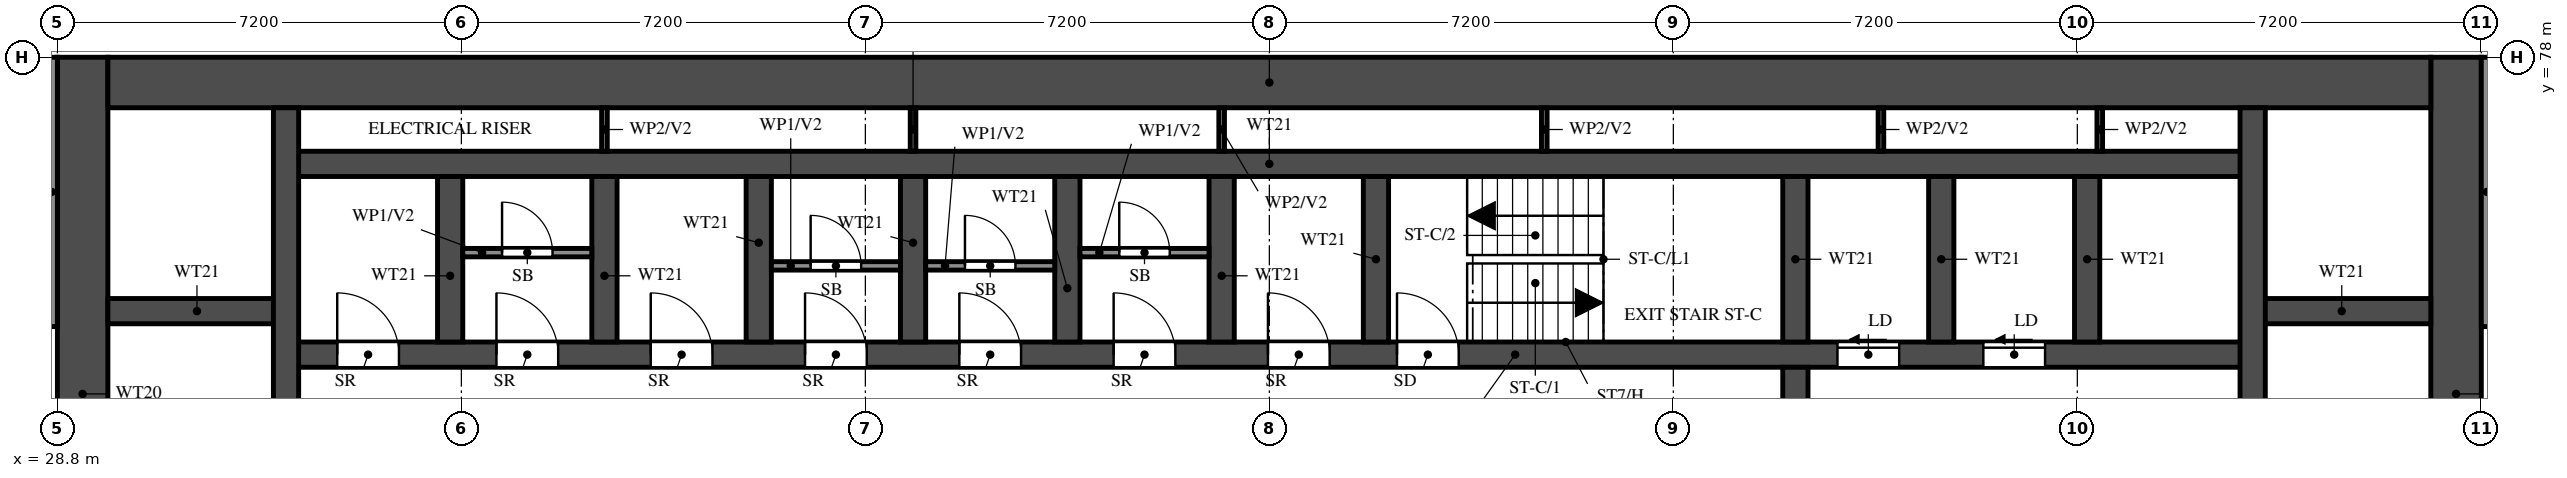
"""IFC4 building model, lengths in metres.
Left out: names, types, materials, properties, quantities, classifications, styles, units other than length and angle.
Written with IfcOpenShell. Run it as: python <this file> out.ifc"""

import sys

from ifc_helpers import new_model, si_unit, direction, frame, frame_2d, origin, place, context, subcontext, project, spatial, rectangle, extrude, element, fill, save


model = new_model("IFC4")
c1 = context("Model", 3, precision=1e-05, world=origin(), true_north=direction((0.0, 1.0)))
c2 = subcontext(c1, "Body", "Model", "MODEL_VIEW")
j1 = project(units=[si_unit("LENGTHUNIT", "METRE"), si_unit("PLANEANGLEUNIT", "RADIAN")], contexts=[c1])
p1 = place(None, origin())
s1 = spatial("IfcSite", under=j1, at=p1, CompositionType="ELEMENT")
p2 = place(p1, origin())
s2 = spatial("IfcBuilding", under=s1, at=p2, CompositionType="ELEMENT")
p3 = place(p2, frame((0.0, 0.0, 76.0)))
s3 = spatial("IfcBuildingStorey", under=s2, at=p3, CompositionType="ELEMENT", Elevation=76.0)
for number, where, z_axis, x_axis in (
    (1, (29.25, 66.0, 0.0), (0.0, 0.0, 1.0), (0.0, 1.0, 0.0)),
    (2, (71.55, 66.0, 0.0), (0.0, 0.0, 1.0), (0.0, 1.0, 0.0)),
):
    element("IfcWall", number, at=place(p3, frame(where, z_axis=z_axis, x_axis=x_axis)), inside=s3, PredefinedType="SHEAR", context=c2, shape_type="SweptSolid", body=[
        extrude(rectangle(XDim=12.0, YDim=0.9, at=frame_2d((6.0, 0.0))), origin(), (0.0, 0.0, 1.0), 3.18),
    ])
p4 = place(p3, frame((29.7, 77.55, 0.0), z_axis=(0.0, 0.0, 1.0), x_axis=(1.0, 0.0, 0.0)))
e3 = element("IfcWall", 3, at=p4, inside=s3, PredefinedType="SHEAR", context=c2, shape_type="SweptSolid", body=[
    extrude(rectangle(XDim=41.4, YDim=0.9, at=frame_2d((20.7, 0.0))), origin(), (0.0, 0.0, 1.0), 3.18),
])
p5 = place(p3, frame((32.875, 72.7, 0.0), z_axis=(0.0, 0.0, 1.0), x_axis=(1.0, 0.0, 0.0)))
e4 = element("IfcWall", 4, at=p5, inside=s3, PredefinedType="SHEAR", context=c2, shape_type="SweptSolid", body=[
    extrude(rectangle(XDim=35.05, YDim=0.45, at=frame_2d((17.525, 0.0))), origin(), (0.0, 0.0, 1.0), 3.18),
])
p6 = place(p5, frame((19.8, 0.0, 0.0)))
e5 = element("IfcOpeningElement", 5, at=p6, cuts=e4, PredefinedType="OPENING", context=c2, shape_type="SweptSolid", body=[
    extrude(rectangle(XDim=1.1, YDim=2.1, at=frame_2d((0.55, 1.05))), frame((0.0, 0.235, 0.0), z_axis=(0.0, -1.0, 0.0), x_axis=(1.0, 0.0, 0.0)), (0.0, 0.0, 1.0), 0.47),
])
p7 = place(p5, frame((27.65, 0.0, 0.0)))
e6 = element("IfcOpeningElement", 6, at=p7, cuts=e4, PredefinedType="OPENING", context=c2, shape_type="SweptSolid", body=[
    extrude(rectangle(XDim=1.1, YDim=2.1, at=frame_2d((0.55, 1.05))), frame((0.0, 0.235, 0.0), z_axis=(0.0, -1.0, 0.0), x_axis=(1.0, 0.0, 0.0)), (0.0, 0.0, 1.0), 0.47),
])
p8 = place(p5, frame((30.25, 0.0, 0.0)))
e7 = element("IfcOpeningElement", 7, at=p8, cuts=e4, PredefinedType="OPENING", context=c2, shape_type="SweptSolid", body=[
    extrude(rectangle(XDim=1.1, YDim=2.1, at=frame_2d((0.55, 1.05))), frame((0.0, 0.235, 0.0), z_axis=(0.0, -1.0, 0.0), x_axis=(1.0, 0.0, 0.0)), (0.0, 0.0, 1.0), 0.47),
])
p9 = place(p5, frame((3.75, 0.0, 0.0)))
e8 = element("IfcOpeningElement", 8, at=p9, cuts=e4, PredefinedType="OPENING", context=c2, shape_type="SweptSolid", body=[
    extrude(rectangle(XDim=1.1, YDim=2.1, at=frame_2d((0.55, 1.05))), frame((0.0, 0.235, 0.0), z_axis=(0.0, -1.0, 0.0), x_axis=(1.0, 0.0, 0.0)), (0.0, 0.0, 1.0), 0.47),
])
p10 = place(p5, frame((6.5, 0.0, 0.0)))
e9 = element("IfcOpeningElement", 9, at=p10, cuts=e4, PredefinedType="OPENING", context=c2, shape_type="SweptSolid", body=[
    extrude(rectangle(XDim=1.1, YDim=2.1, at=frame_2d((0.55, 1.05))), frame((0.0, 0.235, 0.0), z_axis=(0.0, -1.0, 0.0), x_axis=(1.0, 0.0, 0.0)), (0.0, 0.0, 1.0), 0.47),
])
p11 = place(p5, frame((9.25, 0.0, 0.0)))
e10 = element("IfcOpeningElement", 10, at=p11, cuts=e4, PredefinedType="OPENING", context=c2, shape_type="SweptSolid", body=[
    extrude(rectangle(XDim=1.1, YDim=2.1, at=frame_2d((0.55, 1.05))), frame((0.0, 0.235, 0.0), z_axis=(0.0, -1.0, 0.0), x_axis=(1.0, 0.0, 0.0)), (0.0, 0.0, 1.0), 0.47),
])
p12 = place(p5, frame((12.0, 0.0, 0.0)))
e11 = element("IfcOpeningElement", 11, at=p12, cuts=e4, PredefinedType="OPENING", context=c2, shape_type="SweptSolid", body=[
    extrude(rectangle(XDim=1.1, YDim=2.1, at=frame_2d((0.55, 1.05))), frame((0.0, 0.235, 0.0), z_axis=(0.0, -1.0, 0.0), x_axis=(1.0, 0.0, 0.0)), (0.0, 0.0, 1.0), 0.47),
])
p13 = place(p5, frame((14.75, 0.0, 0.0)))
e12 = element("IfcOpeningElement", 12, at=p13, cuts=e4, PredefinedType="OPENING", context=c2, shape_type="SweptSolid", body=[
    extrude(rectangle(XDim=1.1, YDim=2.1, at=frame_2d((0.55, 1.05))), frame((0.0, 0.235, 0.0), z_axis=(0.0, -1.0, 0.0), x_axis=(1.0, 0.0, 0.0)), (0.0, 0.0, 1.0), 0.47),
])
p14 = place(p5, frame((17.5, 0.0, 0.0)))
e13 = element("IfcOpeningElement", 13, at=p14, cuts=e4, PredefinedType="OPENING", context=c2, shape_type="SweptSolid", body=[
    extrude(rectangle(XDim=1.1, YDim=2.1, at=frame_2d((0.55, 1.05))), frame((0.0, 0.235, 0.0), z_axis=(0.0, -1.0, 0.0), x_axis=(1.0, 0.0, 0.0)), (0.0, 0.0, 1.0), 0.47),
])
p15 = place(p5, frame((0.913, 0.0, 0.0)))
e14 = element("IfcOpeningElement", 14, at=p15, cuts=e4, PredefinedType="OPENING", context=c2, shape_type="SweptSolid", body=[
    extrude(rectangle(XDim=1.1, YDim=2.1, at=frame_2d((0.55, 1.05))), frame((0.0, 0.235, 0.0), z_axis=(0.0, -1.0, 0.0), x_axis=(1.0, 0.0, 0.0)), (0.0, 0.0, 1.0), 0.47),
])
p16 = place(p3, frame((32.875, 76.1, 0.0), z_axis=(0.0, 0.0, 1.0), x_axis=(1.0, 0.0, 0.0)))
e15 = element("IfcWall", 15, at=p16, inside=s3, PredefinedType="SHEAR", context=c2, shape_type="SweptSolid", body=[
    extrude(rectangle(XDim=35.05, YDim=0.45, at=frame_2d((17.525, 0.0))), origin(), (0.0, 0.0, 1.0), 3.18),
])
for number, where, z_axis, x_axis in (
    (16, (29.7, 73.475, 0.0), (0.0, 0.0, 1.0), (1.0, 0.0, 0.0)),
    (17, (67.925, 73.475, 0.0), (0.0, 0.0, 1.0), (1.0, 0.0, 0.0)),
):
    element("IfcWall", number, at=place(p3, frame(where, z_axis=z_axis, x_axis=x_axis)), inside=s3, PredefinedType="SHEAR", context=c2, shape_type="SweptSolid", body=[
        extrude(rectangle(XDim=3.175, YDim=0.45, at=frame_2d((1.587, 0.0))), origin(), (0.0, 0.0, 1.0), 3.18),
    ])
p17 = place(p3, frame((32.875, 66.45, 0.0), z_axis=(0.0, 0.0, 1.0), x_axis=(0.0, 1.0, 0.0)))
e18 = element("IfcWall", 18, at=p17, inside=s3, PredefinedType="SHEAR", context=c2, shape_type="SweptSolid", body=[
    extrude(rectangle(XDim=10.65, YDim=0.45, at=frame_2d((5.325, 0.0))), origin(), (0.0, 0.0, 1.0), 3.18),
])
p18 = place(p3, frame((67.925, 66.45, 0.0), z_axis=(0.0, 0.0, 1.0), x_axis=(0.0, 1.0, 0.0)))
e19 = element("IfcWall", 19, at=p18, inside=s3, PredefinedType="SHEAR", context=c2, shape_type="SweptSolid", body=[
    extrude(rectangle(XDim=10.65, YDim=0.45, at=frame_2d((5.325, 0.0))), origin(), (0.0, 0.0, 1.0), 3.18),
])
p19 = place(p18, frame((0.15, 0.0, 0.0)))
e20 = element("IfcOpeningElement", 20, at=p19, cuts=e19, PredefinedType="OPENING", context=c2, shape_type="SweptSolid", body=[
    extrude(rectangle(XDim=1.1, YDim=2.1, at=frame_2d((0.55, 1.05))), frame((0.0, 0.235, 0.0), z_axis=(0.0, -1.0, 0.0), x_axis=(1.0, 0.0, 0.0)), (0.0, 0.0, 1.0), 0.47),
])
p20 = place(p3, frame((59.775, 66.45, 0.0), z_axis=(0.0, 0.0, 1.0), x_axis=(0.0, 1.0, 0.0)))
e21 = element("IfcWall", 21, at=p20, inside=s3, PredefinedType="SHEAR", context=c2, shape_type="SweptSolid", body=[
    extrude(rectangle(XDim=6.025, YDim=0.45, at=frame_2d((3.013, 0.0))), origin(), (0.0, 0.0, 1.0), 3.18),
])
p21 = place(p20, frame((3.85, 0.0, 0.0)))
e22 = element("IfcOpeningElement", 22, at=p21, cuts=e21, PredefinedType="OPENING", context=c2, shape_type="SweptSolid", body=[
    extrude(rectangle(XDim=1.2, YDim=2.1, at=frame_2d((0.6, 1.05))), frame((0.0, 0.235, 0.0), z_axis=(0.0, -1.0, 0.0), x_axis=(1.0, 0.0, 0.0)), (0.0, 0.0, 1.0), 0.47),
])
for number, where, z_axis, x_axis in (
    (23, (59.775, 72.925, 0.0), (0.0, 0.0, 1.0), (0.0, 1.0, 0.0)),
    (24, (35.8, 72.925, 0.0), (0.0, 0.0, 1.0), (0.0, 1.0, 0.0)),
    (25, (38.55, 72.925, 0.0), (0.0, 0.0, 1.0), (0.0, 1.0, 0.0)),
    (26, (41.3, 72.925, 0.0), (0.0, 0.0, 1.0), (0.0, 1.0, 0.0)),
    (27, (44.05, 72.925, 0.0), (0.0, 0.0, 1.0), (0.0, 1.0, 0.0)),
    (28, (46.8, 72.925, 0.0), (0.0, 0.0, 1.0), (0.0, 1.0, 0.0)),
    (29, (49.55, 72.925, 0.0), (0.0, 0.0, 1.0), (0.0, 1.0, 0.0)),
    (30, (52.3, 72.925, 0.0), (0.0, 0.0, 1.0), (0.0, 1.0, 0.0)),
    (31, (62.375, 72.925, 0.0), (0.0, 0.0, 1.0), (0.0, 1.0, 0.0)),
    (32, (64.975, 72.925, 0.0), (0.0, 0.0, 1.0), (0.0, 1.0, 0.0)),
):
    element("IfcWall", number, at=place(p3, frame(where, z_axis=z_axis, x_axis=x_axis)), inside=s3, PredefinedType="SHEAR", context=c2, shape_type="SweptSolid", body=[
        extrude(rectangle(XDim=2.95, YDim=0.45, at=frame_2d((1.475, 0.0))), origin(), (0.0, 0.0, 1.0), 3.18),
    ])
p22 = place(p3, frame((36.025, 74.518, 0.0), z_axis=(0.0, 0.0, 1.0), x_axis=(1.0, 0.0, 0.0)))
e33 = element("IfcWall", 33, at=p22, inside=s3, PredefinedType="PARTITIONING", context=c2, shape_type="SweptSolid", body=[
    extrude(rectangle(XDim=2.3, YDim=0.15, at=frame_2d((1.15, 0.0))), origin(), (0.0, 0.0, 1.0), 3.18),
])
p23 = place(p22, frame((0.7, 0.0, 0.0)))
e34 = element("IfcOpeningElement", 34, at=p23, cuts=e33, PredefinedType="OPENING", context=c2, shape_type="SweptSolid", body=[
    extrude(rectangle(XDim=0.9, YDim=2.1, at=frame_2d((0.45, 1.05))), frame((0.0, 0.085, 0.0), z_axis=(0.0, -1.0, 0.0), x_axis=(1.0, 0.0, 0.0)), (0.0, 0.0, 1.0), 0.17),
])
p24 = place(p3, frame((41.525, 74.282, 0.0), z_axis=(0.0, 0.0, 1.0), x_axis=(1.0, 0.0, 0.0)))
e35 = element("IfcWall", 35, at=p24, inside=s3, PredefinedType="PARTITIONING", context=c2, shape_type="SweptSolid", body=[
    extrude(rectangle(XDim=2.3, YDim=0.15, at=frame_2d((1.15, 0.0))), origin(), (0.0, 0.0, 1.0), 3.18),
])
p25 = place(p24, frame((0.7, 0.0, 0.0)))
e36 = element("IfcOpeningElement", 36, at=p25, cuts=e35, PredefinedType="OPENING", context=c2, shape_type="SweptSolid", body=[
    extrude(rectangle(XDim=0.9, YDim=2.1, at=frame_2d((0.45, 1.05))), frame((0.0, 0.085, 0.0), z_axis=(0.0, -1.0, 0.0), x_axis=(1.0, 0.0, 0.0)), (0.0, 0.0, 1.0), 0.17),
])
p26 = place(p3, frame((44.275, 74.282, 0.0), z_axis=(0.0, 0.0, 1.0), x_axis=(1.0, 0.0, 0.0)))
e37 = element("IfcWall", 37, at=p26, inside=s3, PredefinedType="PARTITIONING", context=c2, shape_type="SweptSolid", body=[
    extrude(rectangle(XDim=2.3, YDim=0.15, at=frame_2d((1.15, 0.0))), origin(), (0.0, 0.0, 1.0), 3.18),
])
p27 = place(p26, frame((0.7, 0.0, 0.0)))
e38 = element("IfcOpeningElement", 38, at=p27, cuts=e37, PredefinedType="OPENING", context=c2, shape_type="SweptSolid", body=[
    extrude(rectangle(XDim=0.9, YDim=2.1, at=frame_2d((0.45, 1.05))), frame((0.0, 0.085, 0.0), z_axis=(0.0, -1.0, 0.0), x_axis=(1.0, 0.0, 0.0)), (0.0, 0.0, 1.0), 0.17),
])
p28 = place(p3, frame((47.025, 74.518, 0.0), z_axis=(0.0, 0.0, 1.0), x_axis=(1.0, 0.0, 0.0)))
e39 = element("IfcWall", 39, at=p28, inside=s3, PredefinedType="PARTITIONING", context=c2, shape_type="SweptSolid", body=[
    extrude(rectangle(XDim=2.3, YDim=0.15, at=frame_2d((1.15, 0.0))), origin(), (0.0, 0.0, 1.0), 3.18),
])
p29 = place(p28, frame((0.7, 0.0, 0.0)))
e40 = element("IfcOpeningElement", 40, at=p29, cuts=e39, PredefinedType="OPENING", context=c2, shape_type="SweptSolid", body=[
    extrude(rectangle(XDim=0.9, YDim=2.1, at=frame_2d((0.45, 1.05))), frame((0.0, 0.085, 0.0), z_axis=(0.0, -1.0, 0.0), x_axis=(1.0, 0.0, 0.0)), (0.0, 0.0, 1.0), 0.17),
])
for number, where, z_axis, x_axis in (
    (41, (38.55, 76.325, 0.0), (0.0, 0.0, 1.0), (0.0, 1.0, 0.0)),
    (42, (44.05, 76.325, 0.0), (0.0, 0.0, 1.0), (0.0, 1.0, 0.0)),
    (43, (49.55, 76.325, 0.0), (0.0, 0.0, 1.0), (0.0, 1.0, 0.0)),
    (44, (55.3, 76.325, 0.0), (0.0, 0.0, 1.0), (0.0, 1.0, 0.0)),
    (45, (61.3, 76.325, 0.0), (0.0, 0.0, 1.0), (0.0, 1.0, 0.0)),
    (46, (65.2, 76.325, 0.0), (0.0, 0.0, 1.0), (0.0, 1.0, 0.0)),
):
    element("IfcWall", number, at=place(p3, frame(where, z_axis=z_axis, x_axis=x_axis)), inside=s3, PredefinedType="PARTITIONING", context=c2, shape_type="SweptSolid", body=[
        extrude(rectangle(XDim=0.775, YDim=0.1, at=frame_2d((0.388, 0.0))), origin(), (0.0, 0.0, 1.0), 3.18),
    ])
for number, where, z_axis, x_axis in (
    (47, (28.7, 73.2, 0.0), (0.0, 0.0, 1.0), (0.0, 1.0, 0.0)),
    (48, (72.1, 73.2, 0.0), (0.0, 0.0, 1.0), (0.0, 1.0, 0.0)),
):
    element("IfcWall", number, at=place(p3, frame(where, z_axis=z_axis, x_axis=x_axis)), inside=s3, PredefinedType="SOLIDWALL", context=c2, shape_type="SweptSolid", body=[
        extrude(rectangle(XDim=4.8, YDim=0.2, at=frame_2d((2.4, 0.0))), origin(), (0.0, 0.0, 1.0), 3.18),
    ])
p30 = place(p6, origin())
e49 = element("IfcDoor", 49, at=p30, inside=s3, OperationType="SINGLE_SWING_LEFT", PredefinedType="DOOR", context=c2, shape_type="SweptSolid", body=[
    extrude(rectangle(XDim=1.1, YDim=2.1, at=frame_2d((0.55, 1.05))), frame((0.0, 0.025, 0.0), z_axis=(0.0, -1.0, 0.0), x_axis=(1.0, 0.0, 0.0)), (0.0, 0.0, 1.0), 0.05),
])
fill(e5, e49)
p31 = place(p7, origin())
e50 = element("IfcDoor", 50, at=p31, inside=s3, OperationType="SLIDING_TO_LEFT", PredefinedType="DOOR", context=c2, shape_type="SweptSolid", body=[
    extrude(rectangle(XDim=1.1, YDim=2.1, at=frame_2d((0.55, 1.05))), frame((0.0, 0.025, 0.0), z_axis=(0.0, -1.0, 0.0), x_axis=(1.0, 0.0, 0.0)), (0.0, 0.0, 1.0), 0.05),
])
fill(e6, e50)
p32 = place(p8, origin())
e51 = element("IfcDoor", 51, at=p32, inside=s3, OperationType="SLIDING_TO_LEFT", PredefinedType="DOOR", context=c2, shape_type="SweptSolid", body=[
    extrude(rectangle(XDim=1.1, YDim=2.1, at=frame_2d((0.55, 1.05))), frame((0.0, 0.025, 0.0), z_axis=(0.0, -1.0, 0.0), x_axis=(1.0, 0.0, 0.0)), (0.0, 0.0, 1.0), 0.05),
])
fill(e7, e51)
p33 = place(p9, origin())
e52 = element("IfcDoor", 52, at=p33, inside=s3, OperationType="SINGLE_SWING_LEFT", PredefinedType="DOOR", context=c2, shape_type="SweptSolid", body=[
    extrude(rectangle(XDim=1.1, YDim=2.1, at=frame_2d((0.55, 1.05))), frame((0.0, 0.025, 0.0), z_axis=(0.0, -1.0, 0.0), x_axis=(1.0, 0.0, 0.0)), (0.0, 0.0, 1.0), 0.05),
])
fill(e8, e52)
p34 = place(p23, origin())
e53 = element("IfcDoor", 53, at=p34, inside=s3, OperationType="SINGLE_SWING_RIGHT", PredefinedType="DOOR", context=c2, shape_type="SweptSolid", body=[
    extrude(rectangle(XDim=0.9, YDim=2.1, at=frame_2d((0.45, 1.05))), frame((0.0, 0.025, 0.0), z_axis=(0.0, -1.0, 0.0), x_axis=(1.0, 0.0, 0.0)), (0.0, 0.0, 1.0), 0.05),
])
fill(e34, e53)
p35 = place(p10, origin())
e54 = element("IfcDoor", 54, at=p35, inside=s3, OperationType="SINGLE_SWING_LEFT", PredefinedType="DOOR", context=c2, shape_type="SweptSolid", body=[
    extrude(rectangle(XDim=1.1, YDim=2.1, at=frame_2d((0.55, 1.05))), frame((0.0, 0.025, 0.0), z_axis=(0.0, -1.0, 0.0), x_axis=(1.0, 0.0, 0.0)), (0.0, 0.0, 1.0), 0.05),
])
fill(e9, e54)
p36 = place(p11, origin())
e55 = element("IfcDoor", 55, at=p36, inside=s3, OperationType="SINGLE_SWING_LEFT", PredefinedType="DOOR", context=c2, shape_type="SweptSolid", body=[
    extrude(rectangle(XDim=1.1, YDim=2.1, at=frame_2d((0.55, 1.05))), frame((0.0, 0.025, 0.0), z_axis=(0.0, -1.0, 0.0), x_axis=(1.0, 0.0, 0.0)), (0.0, 0.0, 1.0), 0.05),
])
fill(e10, e55)
p37 = place(p25, origin())
e56 = element("IfcDoor", 56, at=p37, inside=s3, OperationType="SINGLE_SWING_LEFT", PredefinedType="DOOR", context=c2, shape_type="SweptSolid", body=[
    extrude(rectangle(XDim=0.9, YDim=2.1, at=frame_2d((0.45, 1.05))), frame((0.0, 0.025, 0.0), z_axis=(0.0, -1.0, 0.0), x_axis=(1.0, 0.0, 0.0)), (0.0, 0.0, 1.0), 0.05),
])
fill(e36, e56)
p38 = place(p12, origin())
e57 = element("IfcDoor", 57, at=p38, inside=s3, OperationType="SINGLE_SWING_LEFT", PredefinedType="DOOR", context=c2, shape_type="SweptSolid", body=[
    extrude(rectangle(XDim=1.1, YDim=2.1, at=frame_2d((0.55, 1.05))), frame((0.0, 0.025, 0.0), z_axis=(0.0, -1.0, 0.0), x_axis=(1.0, 0.0, 0.0)), (0.0, 0.0, 1.0), 0.05),
])
fill(e11, e57)
p39 = place(p27, origin())
e58 = element("IfcDoor", 58, at=p39, inside=s3, OperationType="SINGLE_SWING_RIGHT", PredefinedType="DOOR", context=c2, shape_type="SweptSolid", body=[
    extrude(rectangle(XDim=0.9, YDim=2.1, at=frame_2d((0.45, 1.05))), frame((0.0, 0.025, 0.0), z_axis=(0.0, -1.0, 0.0), x_axis=(1.0, 0.0, 0.0)), (0.0, 0.0, 1.0), 0.05),
])
fill(e38, e58)
p40 = place(p13, origin())
e59 = element("IfcDoor", 59, at=p40, inside=s3, OperationType="SINGLE_SWING_LEFT", PredefinedType="DOOR", context=c2, shape_type="SweptSolid", body=[
    extrude(rectangle(XDim=1.1, YDim=2.1, at=frame_2d((0.55, 1.05))), frame((0.0, 0.025, 0.0), z_axis=(0.0, -1.0, 0.0), x_axis=(1.0, 0.0, 0.0)), (0.0, 0.0, 1.0), 0.05),
])
fill(e12, e59)
p41 = place(p29, origin())
e60 = element("IfcDoor", 60, at=p41, inside=s3, OperationType="SINGLE_SWING_RIGHT", PredefinedType="DOOR", context=c2, shape_type="SweptSolid", body=[
    extrude(rectangle(XDim=0.9, YDim=2.1, at=frame_2d((0.45, 1.05))), frame((0.0, 0.025, 0.0), z_axis=(0.0, -1.0, 0.0), x_axis=(1.0, 0.0, 0.0)), (0.0, 0.0, 1.0), 0.05),
])
fill(e40, e60)
p42 = place(p14, origin())
e61 = element("IfcDoor", 61, at=p42, inside=s3, OperationType="SINGLE_SWING_LEFT", PredefinedType="DOOR", context=c2, shape_type="SweptSolid", body=[
    extrude(rectangle(XDim=1.1, YDim=2.1, at=frame_2d((0.55, 1.05))), frame((0.0, 0.025, 0.0), z_axis=(0.0, -1.0, 0.0), x_axis=(1.0, 0.0, 0.0)), (0.0, 0.0, 1.0), 0.05),
])
fill(e13, e61)
p43 = place(p15, origin())
e62 = element("IfcDoor", 62, at=p43, inside=s3, OperationType="SINGLE_SWING_LEFT", PredefinedType="DOOR", context=c2, shape_type="SweptSolid", body=[
    extrude(rectangle(XDim=1.1, YDim=2.1, at=frame_2d((0.55, 1.05))), frame((0.0, 0.025, 0.0), z_axis=(0.0, -1.0, 0.0), x_axis=(1.0, 0.0, 0.0)), (0.0, 0.0, 1.0), 0.05),
])
fill(e14, e62)
save(model, sys.argv[1])
